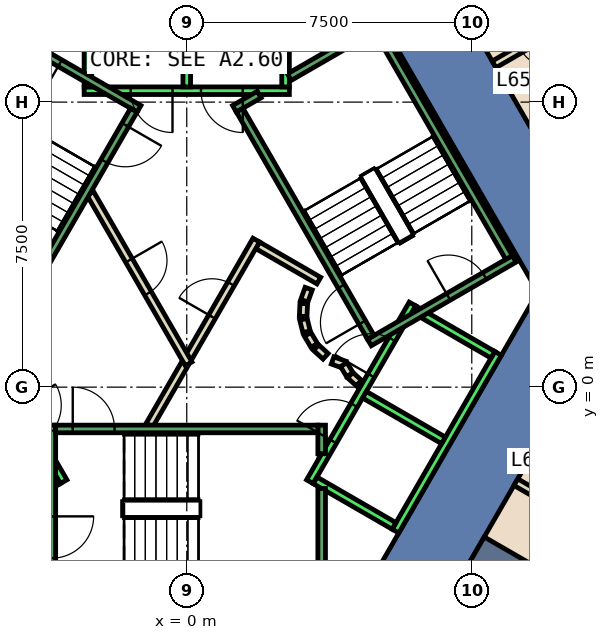
"""IFC4 building model, lengths in metres.
Left out: names, types, materials, properties, quantities, classifications, styles, units other than length and angle.
Written with IfcOpenShell. Run it as: python <this file> out.ifc"""

import sys

from ifc_helpers import new_model, si_unit, direction, frame, frame_2d, origin, place, context, subcontext, project, spatial, polyline, rectangle, outline, extrude, element, fill, save


model = new_model("IFC4")
c1 = context("Model", 3, precision=1e-05, world=origin(), true_north=direction((0.0, 1.0)))
c2 = subcontext(c1, "Body", "Model", "MODEL_VIEW")
j1 = project(units=[si_unit("LENGTHUNIT", "METRE"), si_unit("PLANEANGLEUNIT", "RADIAN")], contexts=[c1])
p1 = place(None, origin())
s1 = spatial("IfcSite", under=j1, at=p1, CompositionType="ELEMENT")
p2 = place(p1, origin())
s2 = spatial("IfcBuilding", under=s1, at=p2, CompositionType="ELEMENT")
p3 = place(p2, frame((0.0, 0.0, 281.0)))
s3 = spatial("IfcBuildingStorey", under=s2, at=p3, CompositionType="ELEMENT", Elevation=281.0)
p4 = place(p3, frame((0.0, 0.0, -0.6)))
e1 = element("IfcWall", 1, at=p4, inside=s3, PredefinedType="SHEAR", context=c2, shape_type="SweptSolid", body=[
    extrude(outline(polyline([(6.786, 10.747), (5.054, 9.747), (9.238, 2.5), (11.547, 2.5), (6.786, 10.747)])), origin(), (0.0, 0.0, 1.0), 5.4),
])
p5 = place(p3, frame((0.0, 0.0, -0.6)))
e2 = element("IfcWall", 2, at=p5, inside=s3, PredefinedType="SHEAR", context=c2, shape_type="SweptSolid", body=[
    extrude(outline(polyline([(5.774, -7.5), (11.547, 2.5), (9.238, 2.5), (4.619, -5.5), (5.774, -7.5)])), origin(), (0.0, 0.0, 1.0), 5.4),
])
p6 = place(p3, frame((7.578, -4.375, 0.0), z_axis=(0.0, 0.0, 1.0), x_axis=(0.866020754303, -0.500008053052, 0.0)))
e3 = element("IfcWall", 3, at=p6, inside=s3, PredefinedType="SHEAR", context=c2, shape_type="SweptSolid", body=[
    extrude(rectangle(XDim=20.374, YDim=1.0, at=frame_2d((10.187, 0.0))), origin(), (0.0, 0.0, 1.0), 4.8),
])
p7 = place(p3, frame((-0.982, -1.0, 0.0), z_axis=(0.0, 0.0, 1.0), x_axis=(0.50024047865, 0.865886518847, 0.0)))
e4 = element("IfcWall", 4, at=p7, inside=s3, PredefinedType="PARTITIONING", context=c2, shape_type="SweptSolid", body=[
    extrude(rectangle(XDim=1.863, YDim=0.2, at=frame_2d((0.931, 0.0))), origin(), (0.0, 0.0, 1.0), 4.8),
])
p8 = place(p3, frame((1.866, 3.732, 0.0), z_axis=(0.0, 0.0, 1.0), x_axis=(0.866043361281, -0.499968895414, 0.0)))
e5 = element("IfcWall", 5, at=p8, inside=s3, PredefinedType="PARTITIONING", context=c2, shape_type="SweptSolid", body=[
    extrude(rectangle(XDim=1.858, YDim=0.2, at=frame_2d((0.929, 0.0))), origin(), (0.0, 0.0, 1.0), 4.8),
])
p9 = place(p3, frame((3.208, 2.592, 0.0), z_axis=(0.0, 0.0, 1.0), x_axis=(-0.337388820924, -0.941365382578, 0.0)))
e6 = element("IfcWall", 6, at=p9, inside=s3, PredefinedType="PARTITIONING", context=c2, shape_type="SweptSolid", body=[
    extrude(rectangle(XDim=0.338, YDim=0.2, at=frame_2d((0.169, 0.0))), origin(), (0.0, 0.0, 1.0), 4.8),
])
p10 = place(p3, frame((3.079, 2.199, 0.0), z_axis=(0.0, 0.0, 1.0), x_axis=(-0.047771483479, -0.998858290933, 0.0)))
e7 = element("IfcWall", 7, at=p10, inside=s3, PredefinedType="PARTITIONING", context=c2, shape_type="SweptSolid", body=[
    extrude(rectangle(XDim=0.337, YDim=0.2, at=frame_2d((0.169, 0.0))), origin(), (0.0, 0.0, 1.0), 4.8),
])
p11 = place(p3, frame((3.07, 1.786, 0.0), z_axis=(0.0, 0.0, 1.0), x_axis=(0.242705583207, -0.970099994784, 0.0)))
e8 = element("IfcWall", 8, at=p11, inside=s3, PredefinedType="PARTITIONING", context=c2, shape_type="SweptSolid", body=[
    extrude(rectangle(XDim=0.338, YDim=0.2, at=frame_2d((0.169, 0.0))), origin(), (0.0, 0.0, 1.0), 4.8),
])
for number, where, z_axis, x_axis in (
    (9, (3.182, 1.388, 0.0), (0.0, 0.0, 1.0), (0.512, -0.859, 0.0)),
    (10, (3.404, 1.039, 0.0), (0.0, 0.0, 1.0), (0.74, -0.672, 0.0)),
):
    element("IfcWall", number, at=place(p3, frame(where, z_axis=z_axis, x_axis=x_axis)), inside=s3, PredefinedType="PARTITIONING", context=c2, shape_type="SweptSolid", body=[
        extrude(rectangle(XDim=0.338, YDim=0.2, at=frame_2d((0.169, 0.0))), origin(), (0.0, 0.0, 1.0), 4.8),
    ])
p12 = place(p3, frame((3.838, 0.702, 0.0), z_axis=(0.0, 0.0, 1.0), x_axis=(0.941035081519, -0.338308993895, 0.0)))
e11 = element("IfcWall", 11, at=p12, inside=s3, PredefinedType="PARTITIONING", context=c2, shape_type="SweptSolid", body=[
    extrude(rectangle(XDim=0.337, YDim=0.2, at=frame_2d((0.168, 0.0))), origin(), (0.0, 0.0, 1.0), 4.8),
])
p13 = place(p3, frame((4.132, 0.593, 0.0), z_axis=(0.0, 0.0, 1.0), x_axis=(0.513561617048, -0.858052717201, 0.0)))
e12 = element("IfcWall", 12, at=p13, inside=s3, PredefinedType="PARTITIONING", context=c2, shape_type="SweptSolid", body=[
    extrude(rectangle(XDim=0.308, YDim=0.2, at=frame_2d((0.154, 0.0))), origin(), (0.0, 0.0, 1.0), 4.8),
])
p14 = place(p3, frame((4.301, 0.315, 0.0), z_axis=(0.0, 0.0, 1.0), x_axis=(0.741798017506, -0.670623367639, 0.0)))
e13 = element("IfcWall", 13, at=p14, inside=s3, PredefinedType="PARTITIONING", context=c2, shape_type="SweptSolid", body=[
    extrude(rectangle(XDim=0.309, YDim=0.2, at=frame_2d((0.154, 0.0))), origin(), (0.0, 0.0, 1.0), 4.8),
])
p15 = place(p3, frame((0.05, 0.787, 0.0), z_axis=(0.0, 0.0, 1.0), x_axis=(0.499954076797, 0.866051915934, 0.0)))
e14 = element("IfcWall", 14, at=p15, inside=s3, PredefinedType="PARTITIONING", context=c2, shape_type="SweptSolid", body=[
    extrude(rectangle(XDim=3.558, YDim=0.2, at=frame_2d((1.779, 0.0))), origin(), (0.0, 0.0, 1.0), 4.8),
])
p16 = place(p15, frame((1.229, 0.0, 0.0)))
e15 = element("IfcOpeningElement", 15, at=p16, cuts=e14, PredefinedType="OPENING", context=c2, shape_type="SweptSolid", body=[
    extrude(rectangle(XDim=1.0, YDim=2.1, at=frame_2d((0.5, 1.05))), frame((0.0, 0.11, 0.0), z_axis=(0.0, -1.0, 0.0), x_axis=(1.0, 0.0, 0.0)), (0.0, 0.0, 1.0), 0.22),
])
p17 = place(p3, frame((-2.54, 5.1, 0.0), z_axis=(0.0, 0.0, 1.0), x_axis=(0.499925051871, -0.866068670783, 0.0)))
e16 = element("IfcWall", 16, at=p17, inside=s3, PredefinedType="PARTITIONING", context=c2, shape_type="SweptSolid", body=[
    extrude(rectangle(XDim=5.181, YDim=0.2, at=frame_2d((2.59, 0.0))), origin(), (0.0, 0.0, 1.0), 4.8),
])
p18 = place(p17, frame((2.04, 0.0, 0.0)))
e17 = element("IfcOpeningElement", 17, at=p18, cuts=e16, PredefinedType="OPENING", context=c2, shape_type="SweptSolid", body=[
    extrude(rectangle(XDim=1.0, YDim=2.1, at=frame_2d((0.5, 1.05))), frame((0.0, 0.11, 0.0), z_axis=(0.0, -1.0, 0.0), x_axis=(1.0, 0.0, 0.0)), (0.0, 0.0, 1.0), 0.22),
])
p19 = place(p3, frame((10.652, -3.65, 0.0), z_axis=(0.0, 0.0, 1.0), x_axis=(-0.866079547155, 0.499906209203, 0.0)))
e18 = element("IfcWall", 18, at=p19, inside=s3, PredefinedType="PARTITIONING", context=c2, shape_type="SweptSolid", body=[
    extrude(rectangle(XDim=2.3, YDim=0.2, at=frame_2d((1.15, 0.0))), origin(), (0.0, 0.0, 1.0), 4.8),
])
p20 = place(p19, frame((0.721, 0.0, 0.0)))
e19 = element("IfcOpeningElement", 19, at=p20, cuts=e18, PredefinedType="OPENING", context=c2, shape_type="SweptSolid", body=[
    extrude(rectangle(XDim=1.0, YDim=2.1, at=frame_2d((0.5, 1.05))), frame((0.0, 0.11, 0.0), z_axis=(0.0, -1.0, 0.0), x_axis=(1.0, 0.0, 0.0)), (0.0, 0.0, 1.0), 0.22),
])
p21 = place(p3, frame((10.165, 9.693, 0.0), z_axis=(0.0, 0.0, 1.0), x_axis=(-0.865955154139, -0.50012165622, 0.0)))
e20 = element("IfcWall", 20, at=p21, inside=s3, PredefinedType="PARTITIONING", context=c2, shape_type="SweptSolid", body=[
    extrude(rectangle(XDim=2.4, YDim=0.2, at=frame_2d((1.2, 0.0))), origin(), (0.0, 0.0, 1.0), 2.4),
])
p22 = place(p21, frame((0.6, 0.0, 0.0)))
e21 = element("IfcOpeningElement", 21, at=p22, cuts=e20, PredefinedType="OPENING", context=c2, shape_type="SweptSolid", body=[
    extrude(rectangle(XDim=1.0, YDim=2.1, at=frame_2d((0.5, 1.05))), frame((0.0, 0.11, 0.0), z_axis=(0.0, -1.0, 0.0), x_axis=(1.0, 0.0, 0.0)), (0.0, 0.0, 1.0), 0.22),
])
p23 = place(p3, frame((2.7, 7.8, 0.0), z_axis=(0.0, 0.0, 1.0), x_axis=(-1.0, 0.0, 0.0)))
e22 = element("IfcWall", 22, at=p23, inside=s3, PredefinedType="STANDARD", context=c2, shape_type="SweptSolid", body=[
    extrude(rectangle(XDim=5.4, YDim=0.2, at=frame_2d((2.7, 0.0))), origin(), (0.0, 0.0, 1.0), 4.8),
])
p24 = place(p23, frame((1.225, 0.0, 0.0)))
e23 = element("IfcOpeningElement", 23, at=p24, cuts=e22, PredefinedType="OPENING", context=c2, shape_type="SweptSolid", body=[
    extrude(rectangle(XDim=1.1, YDim=2.1, at=frame_2d((0.55, 1.05))), frame((0.0, 0.11, 0.0), z_axis=(0.0, -1.0, 0.0), x_axis=(1.0, 0.0, 0.0)), (0.0, 0.0, 1.0), 0.22),
])
p25 = place(p23, frame((3.075, 0.0, 0.0)))
e24 = element("IfcOpeningElement", 24, at=p25, cuts=e22, PredefinedType="OPENING", context=c2, shape_type="SweptSolid", body=[
    extrude(rectangle(XDim=1.1, YDim=2.1, at=frame_2d((0.55, 1.05))), frame((0.0, 0.11, 0.0), z_axis=(0.0, -1.0, 0.0), x_axis=(1.0, 0.0, 0.0)), (0.0, 0.0, 1.0), 0.22),
])
for number, where, z_axis, x_axis in (
    (25, (2.6, 7.9, 0.0), (0.0, 0.0, 1.0), (0.0, 1.0, 0.0)),
    (26, (0.0, 7.9, 0.0), (0.0, 0.0, 1.0), (0.0, 1.0, 0.0)),
    (27, (-2.6, 7.9, 0.0), (0.0, 0.0, 1.0), (0.0, 1.0, 0.0)),
):
    element("IfcWall", number, at=place(p3, frame(where, z_axis=z_axis, x_axis=x_axis)), inside=s3, PredefinedType="STANDARD", context=c2, shape_type="SweptSolid", body=[
        extrude(rectangle(XDim=2.4, YDim=0.2, at=frame_2d((1.2, 0.0))), origin(), (0.0, 0.0, 1.0), 4.8),
    ])
p26 = place(p3, frame((-5.94, 2.188, 0.0), z_axis=(0.0, 0.0, 1.0), x_axis=(0.500034260056, -0.866005622828, 0.0)))
e28 = element("IfcWall", 28, at=p26, inside=s3, PredefinedType="STANDARD", context=c2, shape_type="SweptSolid", body=[
    extrude(rectangle(XDim=5.399, YDim=0.2, at=frame_2d((2.7, 0.0))), origin(), (0.0, 0.0, 1.0), 4.8),
])
p27 = place(p26, frame((3.075, 0.0, 0.0)))
e29 = element("IfcOpeningElement", 29, at=p27, cuts=e28, PredefinedType="OPENING", context=c2, shape_type="SweptSolid", body=[
    extrude(rectangle(XDim=1.1, YDim=2.1, at=frame_2d((0.55, 1.05))), frame((0.0, 0.11, 0.0), z_axis=(0.0, -1.0, 0.0), x_axis=(1.0, 0.0, 0.0)), (0.0, 0.0, 1.0), 0.22),
])
p28 = place(p26, frame((1.225, 0.0, 0.0)))
e30 = element("IfcOpeningElement", 30, at=p28, cuts=e28, PredefinedType="OPENING", context=c2, shape_type="SweptSolid", body=[
    extrude(rectangle(XDim=1.1, YDim=2.1, at=frame_2d((0.55, 1.05))), frame((0.0, 0.11, 0.0), z_axis=(0.0, -1.0, 0.0), x_axis=(1.0, 0.0, 0.0)), (0.0, 0.0, 1.0), 0.22),
])
p29 = place(p3, frame((-3.377, -2.452, 0.0), z_axis=(0.0, 0.0, 1.0), x_axis=(-0.865955154139, -0.50012165622, 0.0)))
e31 = element("IfcWall", 31, at=p29, inside=s3, PredefinedType="STANDARD", context=c2, shape_type="SweptSolid", body=[
    extrude(rectangle(XDim=2.4, YDim=0.2, at=frame_2d((1.2, 0.0))), origin(), (0.0, 0.0, 1.0), 4.8),
])
p30 = place(p3, frame((3.24, -2.488, 0.0), z_axis=(0.0, 0.0, 1.0), x_axis=(0.500034260056, 0.866005622828, 0.0)))
e32 = element("IfcWall", 32, at=p30, inside=s3, PredefinedType="STANDARD", context=c2, shape_type="SweptSolid", body=[
    extrude(rectangle(XDim=5.399, YDim=0.2, at=frame_2d((2.7, 0.0))), origin(), (0.0, 0.0, 1.0), 4.8),
])
p31 = place(p30, frame((3.225, 0.0, 0.0)))
e33 = element("IfcOpeningElement", 33, at=p31, cuts=e32, PredefinedType="OPENING", context=c2, shape_type="SweptSolid", body=[
    extrude(rectangle(XDim=1.1, YDim=2.1, at=frame_2d((0.55, 1.05))), frame((0.0, 0.11, 0.0), z_axis=(0.0, -1.0, 0.0), x_axis=(1.0, 0.0, 0.0)), (0.0, 0.0, 1.0), 0.22),
])
p32 = place(p30, frame((1.225, 0.0, 0.0)))
e34 = element("IfcOpeningElement", 34, at=p32, cuts=e32, PredefinedType="OPENING", context=c2, shape_type="SweptSolid", body=[
    extrude(rectangle(XDim=1.1, YDim=2.1, at=frame_2d((0.55, 1.05))), frame((0.0, 0.11, 0.0), z_axis=(0.0, -1.0, 0.0), x_axis=(1.0, 0.0, 0.0)), (0.0, 0.0, 1.0), 0.22),
])
p33 = place(p3, frame((5.492, -3.788, 0.0), z_axis=(0.0, 0.0, 1.0), x_axis=(0.500034260056, 0.866005622828, 0.0)))
e35 = element("IfcWall", 35, at=p33, inside=s3, PredefinedType="STANDARD", context=c2, shape_type="SweptSolid", body=[
    extrude(rectangle(XDim=5.399, YDim=0.2, at=frame_2d((2.7, 0.0))), origin(), (0.0, 0.0, 1.0), 4.8),
])
p34 = place(p3, frame((3.377, -2.452, 0.0), z_axis=(0.0, 0.0, 1.0), x_axis=(0.865955154139, -0.50012165622, 0.0)))
e36 = element("IfcWall", 36, at=p34, inside=s3, PredefinedType="STANDARD", context=c2, shape_type="SweptSolid", body=[
    extrude(rectangle(XDim=2.4, YDim=0.2, at=frame_2d((1.2, 0.0))), origin(), (0.0, 0.0, 1.0), 4.8),
])
for number, where, z_axis, x_axis in (
    (37, (4.677, -0.2, 0.0), (0.0, 0.0, 1.0), (0.866, -0.5, 0.0)),
    (38, (5.977, 2.052, 0.0), (0.0, 0.0, 1.0), (0.866, -0.5, 0.0)),
):
    element("IfcWall", number, at=place(p3, frame(where, z_axis=z_axis, x_axis=x_axis)), inside=s3, PredefinedType="STANDARD", context=c2, shape_type="SweptSolid", body=[
        extrude(rectangle(XDim=2.399, YDim=0.2, at=frame_2d((1.2, 0.0))), origin(), (0.0, 0.0, 1.0), 4.8),
    ])
p35 = place(p3, frame((-3.55, -1.0, 0.0), z_axis=(0.0, 0.0, 1.0), x_axis=(0.0, -1.0, 0.0)))
e39 = element("IfcWall", 39, at=p35, inside=s3, PredefinedType="STANDARD", context=c2, shape_type="SweptSolid", body=[
    extrude(rectangle(XDim=4.4, YDim=0.2, at=frame_2d((2.2, 0.0))), origin(), (0.0, 0.0, 1.0), 4.8),
])
p36 = place(p35, frame((2.4, 0.0, 0.0)))
e40 = element("IfcOpeningElement", 40, at=p36, cuts=e39, PredefinedType="OPENING", context=c2, shape_type="SweptSolid", body=[
    extrude(rectangle(XDim=1.1, YDim=2.2, at=frame_2d((0.55, 1.1))), frame((0.0, 0.11, 0.0), z_axis=(0.0, -1.0, 0.0), x_axis=(1.0, 0.0, 0.0)), (0.0, 0.0, 1.0), 0.22),
])
p37 = place(p3, frame((3.55, -2.667, 0.0), z_axis=(0.0, 0.0, 1.0), x_axis=(0.0, -1.0, 0.0)))
e41 = element("IfcWall", 41, at=p37, inside=s3, PredefinedType="STANDARD", context=c2, shape_type="SweptSolid", body=[
    extrude(rectangle(XDim=2.733, YDim=0.2, at=frame_2d((1.366, 0.0))), origin(), (0.0, 0.0, 1.0), 4.8),
])
p38 = place(p3, frame((3.55, -1.0, 0.0), z_axis=(0.0, 0.0, 1.0), x_axis=(0.0, -1.0, 0.0)))
e42 = element("IfcWall", 42, at=p38, inside=s3, PredefinedType="STANDARD", context=c2, shape_type="SweptSolid", body=[
    extrude(rectangle(XDim=0.751, YDim=0.2, at=frame_2d((0.375, 0.0))), origin(), (0.0, 0.0, 1.0), 4.8),
])
p39 = place(p3, frame((-3.45, -1.1, 0.0), z_axis=(0.0, 0.0, 1.0), x_axis=(1.0, 0.0, 0.0)))
e43 = element("IfcWall", 43, at=p39, inside=s3, PredefinedType="STANDARD", context=c2, shape_type="SweptSolid", body=[
    extrude(rectangle(XDim=6.9, YDim=0.2, at=frame_2d((3.45, 0.0))), origin(), (0.0, 0.0, 1.0), 4.8),
])
p40 = place(p39, frame((0.45, 0.0, 0.0)))
e44 = element("IfcOpeningElement", 44, at=p40, cuts=e43, PredefinedType="OPENING", context=c2, shape_type="SweptSolid", body=[
    extrude(rectangle(XDim=1.1, YDim=2.2, at=frame_2d((0.55, 1.1))), frame((0.0, 0.11, 0.0), z_axis=(0.0, -1.0, 0.0), x_axis=(1.0, 0.0, 0.0)), (0.0, 0.0, 1.0), 0.22),
])
p41 = place(p3, frame((4.806, 1.176, 0.0), z_axis=(0.0, 0.0, 1.0), x_axis=(0.866059941101, 0.499940174841, 0.0)))
e45 = element("IfcWall", 45, at=p41, inside=s3, PredefinedType="STANDARD", context=c2, shape_type="SweptSolid", body=[
    extrude(rectangle(XDim=4.4, YDim=0.2, at=frame_2d((2.2, 0.0))), origin(), (0.0, 0.0, 1.0), 4.8),
])
p42 = place(p41, frame((2.4, 0.0, 0.0)))
e46 = element("IfcOpeningElement", 46, at=p42, cuts=e45, PredefinedType="OPENING", context=c2, shape_type="SweptSolid", body=[
    extrude(rectangle(XDim=1.1, YDim=2.2, at=frame_2d((0.55, 1.1))), frame((0.0, 0.11, 0.0), z_axis=(0.0, -1.0, 0.0), x_axis=(1.0, 0.0, 0.0)), (0.0, 0.0, 1.0), 0.22),
])
p43 = place(p3, frame((2.7, 8.158, 0.0), z_axis=(0.0, 0.0, 1.0), x_axis=(0.86611865017, 0.499838457731, 0.0)))
e47 = element("IfcWall", 47, at=p43, inside=s3, PredefinedType="STANDARD", context=c2, shape_type="SweptSolid", body=[
    extrude(rectangle(XDim=2.733, YDim=0.2, at=frame_2d((1.366, 0.0))), origin(), (0.0, 0.0, 1.0), 4.8),
])
p44 = place(p3, frame((1.256, 7.324, 0.0), z_axis=(0.0, 0.0, 1.0), x_axis=(0.865915093549, 0.500191014278, 0.0)))
e48 = element("IfcWall", 48, at=p44, inside=s3, PredefinedType="STANDARD", context=c2, shape_type="SweptSolid", body=[
    extrude(rectangle(XDim=0.752, YDim=0.2, at=frame_2d((0.376, 0.0))), origin(), (0.0, 0.0, 1.0), 4.8),
])
p45 = place(p3, frame((4.843, 1.312, 0.0), z_axis=(0.0, 0.0, 1.0), x_axis=(-0.499963383562, 0.866046543262, 0.0)))
e49 = element("IfcWall", 49, at=p45, inside=s3, PredefinedType="STANDARD", context=c2, shape_type="SweptSolid", body=[
    extrude(rectangle(XDim=6.9, YDim=0.2, at=frame_2d((3.45, 0.0))), origin(), (0.0, 0.0, 1.0), 4.8),
])
p46 = place(p45, frame((0.45, 0.0, 0.0)))
e50 = element("IfcOpeningElement", 50, at=p46, cuts=e49, PredefinedType="OPENING", context=c2, shape_type="SweptSolid", body=[
    extrude(rectangle(XDim=1.1, YDim=2.2, at=frame_2d((0.55, 1.1))), frame((0.0, 0.11, 0.0), z_axis=(0.0, -1.0, 0.0), x_axis=(1.0, 0.0, 0.0)), (0.0, 0.0, 1.0), 0.22),
])
p47 = place(p3, frame((8.48, 3.412, 0.0), z_axis=(0.0, 0.0, 1.0), x_axis=(-0.499978703459, 0.866037698999, 0.0)))
e51 = element("IfcWall", 51, at=p47, inside=s3, PredefinedType="STANDARD", context=c2, shape_type="SweptSolid", body=[
    extrude(rectangle(XDim=6.9, YDim=0.2, at=frame_2d((3.45, 0.0))), origin(), (0.0, 0.0, 1.0), 4.8),
])
p48 = place(p3, frame((-1.256, 7.324, 0.0), z_axis=(0.0, 0.0, 1.0), x_axis=(-0.866046073146, 0.499964197906, 0.0)))
e52 = element("IfcWall", 52, at=p48, inside=s3, PredefinedType="STANDARD", context=c2, shape_type="SweptSolid", body=[
    extrude(rectangle(XDim=4.4, YDim=0.2, at=frame_2d((2.2, 0.0))), origin(), (0.0, 0.0, 1.0), 4.8),
])
p49 = place(p48, frame((2.4, 0.0, 0.0)))
e53 = element("IfcOpeningElement", 53, at=p49, cuts=e52, PredefinedType="OPENING", context=c2, shape_type="SweptSolid", body=[
    extrude(rectangle(XDim=1.1, YDim=2.2, at=frame_2d((0.55, 1.1))), frame((0.0, 0.11, 0.0), z_axis=(0.0, -1.0, 0.0), x_axis=(1.0, 0.0, 0.0)), (0.0, 0.0, 1.0), 0.22),
])
p50 = place(p3, frame((-1.393, 7.288, 0.0), z_axis=(0.0, 0.0, 1.0), x_axis=(-0.499963383562, -0.866046543262, 0.0)))
e54 = element("IfcWall", 54, at=p50, inside=s3, PredefinedType="STANDARD", context=c2, shape_type="SweptSolid", body=[
    extrude(rectangle(XDim=6.9, YDim=0.2, at=frame_2d((3.45, 0.0))), origin(), (0.0, 0.0, 1.0), 4.8),
])
p51 = place(p50, frame((0.45, 0.0, 0.0)))
e55 = element("IfcOpeningElement", 55, at=p51, cuts=e54, PredefinedType="OPENING", context=c2, shape_type="SweptSolid", body=[
    extrude(rectangle(XDim=1.1, YDim=2.2, at=frame_2d((0.55, 1.1))), frame((0.0, 0.11, 0.0), z_axis=(0.0, -1.0, 0.0), x_axis=(1.0, 0.0, 0.0)), (0.0, 0.0, 1.0), 0.22),
])
p52 = place(p16, origin())
e56 = element("IfcDoor", 56, at=p52, inside=s3, OperationType="SINGLE_SWING_RIGHT", PredefinedType="DOOR", context=c2, shape_type="SweptSolid", body=[
    extrude(rectangle(XDim=1.0, YDim=2.1, at=frame_2d((0.5, 1.05))), frame((0.0, 0.025, 0.0), z_axis=(0.0, -1.0, 0.0), x_axis=(1.0, 0.0, 0.0)), (0.0, 0.0, 1.0), 0.05),
])
fill(e15, e56)
p53 = place(p18, origin())
e57 = element("IfcDoor", 57, at=p53, inside=s3, OperationType="SINGLE_SWING_RIGHT", PredefinedType="DOOR", context=c2, shape_type="SweptSolid", body=[
    extrude(rectangle(XDim=1.0, YDim=2.1, at=frame_2d((0.5, 1.05))), frame((0.0, 0.025, 0.0), z_axis=(0.0, -1.0, 0.0), x_axis=(1.0, 0.0, 0.0)), (0.0, 0.0, 1.0), 0.05),
])
fill(e17, e57)
p54 = place(p24, origin())
e58 = element("IfcDoor", 58, at=p54, inside=s3, OperationType="SLIDING_TO_LEFT", PredefinedType="DOOR", context=c2, shape_type="SweptSolid", body=[
    extrude(rectangle(XDim=1.1, YDim=2.1, at=frame_2d((0.55, 1.05))), frame((0.0, 0.025, 0.0), z_axis=(0.0, -1.0, 0.0), x_axis=(1.0, 0.0, 0.0)), (0.0, 0.0, 1.0), 0.05),
])
fill(e23, e58)
p55 = place(p25, origin())
e59 = element("IfcDoor", 59, at=p55, inside=s3, OperationType="SLIDING_TO_LEFT", PredefinedType="DOOR", context=c2, shape_type="SweptSolid", body=[
    extrude(rectangle(XDim=1.1, YDim=2.1, at=frame_2d((0.55, 1.05))), frame((0.0, 0.025, 0.0), z_axis=(0.0, -1.0, 0.0), x_axis=(1.0, 0.0, 0.0)), (0.0, 0.0, 1.0), 0.05),
])
fill(e24, e59)
p56 = place(p31, origin())
e60 = element("IfcDoor", 60, at=p56, inside=s3, OperationType="SLIDING_TO_LEFT", PredefinedType="DOOR", context=c2, shape_type="SweptSolid", body=[
    extrude(rectangle(XDim=1.1, YDim=2.1, at=frame_2d((0.55, 1.05))), frame((0.0, 0.025, 0.0), z_axis=(0.0, -1.0, 0.0), x_axis=(1.0, 0.0, 0.0)), (0.0, 0.0, 1.0), 0.05),
])
fill(e33, e60)
p57 = place(p32, origin())
e61 = element("IfcDoor", 61, at=p57, inside=s3, OperationType="SLIDING_TO_LEFT", PredefinedType="DOOR", context=c2, shape_type="SweptSolid", body=[
    extrude(rectangle(XDim=1.1, YDim=2.1, at=frame_2d((0.55, 1.05))), frame((0.0, 0.025, 0.0), z_axis=(0.0, -1.0, 0.0), x_axis=(1.0, 0.0, 0.0)), (0.0, 0.0, 1.0), 0.05),
])
fill(e34, e61)
p58 = place(p40, origin())
e62 = element("IfcDoor", 62, at=p58, inside=s3, OperationType="SINGLE_SWING_LEFT", PredefinedType="DOOR", context=c2, shape_type="SweptSolid", body=[
    extrude(rectangle(XDim=1.1, YDim=2.2, at=frame_2d((0.55, 1.1))), frame((0.0, 0.025, 0.0), z_axis=(0.0, -1.0, 0.0), x_axis=(1.0, 0.0, 0.0)), (0.0, 0.0, 1.0), 0.05),
])
fill(e44, e62)
p59 = place(p36, origin())
e63 = element("IfcDoor", 63, at=p59, inside=s3, OperationType="SINGLE_SWING_LEFT", PredefinedType="DOOR", context=c2, shape_type="SweptSolid", body=[
    extrude(rectangle(XDim=1.1, YDim=2.2, at=frame_2d((0.55, 1.1))), frame((0.0, 0.025, 0.0), z_axis=(0.0, -1.0, 0.0), x_axis=(1.0, 0.0, 0.0)), (0.0, 0.0, 1.0), 0.05),
])
fill(e40, e63)
p60 = place(p46, origin())
e64 = element("IfcDoor", 64, at=p60, inside=s3, OperationType="SINGLE_SWING_LEFT", PredefinedType="DOOR", context=c2, shape_type="SweptSolid", body=[
    extrude(rectangle(XDim=1.1, YDim=2.2, at=frame_2d((0.55, 1.1))), frame((0.0, 0.025, 0.0), z_axis=(0.0, -1.0, 0.0), x_axis=(1.0, 0.0, 0.0)), (0.0, 0.0, 1.0), 0.05),
])
fill(e50, e64)
p61 = place(p42, origin())
e65 = element("IfcDoor", 65, at=p61, inside=s3, OperationType="SINGLE_SWING_LEFT", PredefinedType="DOOR", context=c2, shape_type="SweptSolid", body=[
    extrude(rectangle(XDim=1.1, YDim=2.2, at=frame_2d((0.55, 1.1))), frame((0.0, 0.025, 0.0), z_axis=(0.0, -1.0, 0.0), x_axis=(1.0, 0.0, 0.0)), (0.0, 0.0, 1.0), 0.05),
])
fill(e46, e65)
p62 = place(p51, origin())
e66 = element("IfcDoor", 66, at=p62, inside=s3, OperationType="SINGLE_SWING_LEFT", PredefinedType="DOOR", context=c2, shape_type="SweptSolid", body=[
    extrude(rectangle(XDim=1.1, YDim=2.2, at=frame_2d((0.55, 1.1))), frame((0.0, 0.025, 0.0), z_axis=(0.0, -1.0, 0.0), x_axis=(1.0, 0.0, 0.0)), (0.0, 0.0, 1.0), 0.05),
])
fill(e55, e66)
p63 = place(p49, origin())
e67 = element("IfcDoor", 67, at=p63, inside=s3, OperationType="SINGLE_SWING_LEFT", PredefinedType="DOOR", context=c2, shape_type="SweptSolid", body=[
    extrude(rectangle(XDim=1.1, YDim=2.2, at=frame_2d((0.55, 1.1))), frame((0.0, 0.025, 0.0), z_axis=(0.0, -1.0, 0.0), x_axis=(1.0, 0.0, 0.0)), (0.0, 0.0, 1.0), 0.05),
])
fill(e53, e67)
save(model, sys.argv[1])
